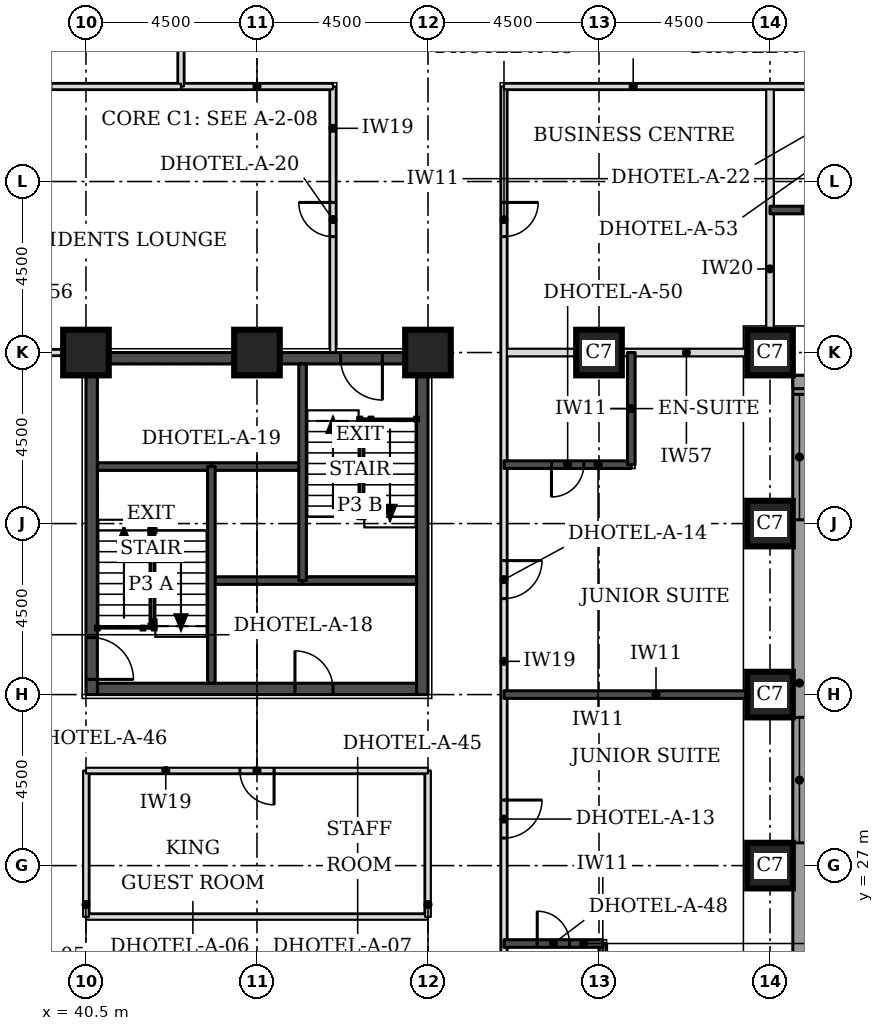
"""IFC4 building model, lengths in metres.
Left out: names, types, materials, properties, quantities, classifications, styles, units other than length and angle.
Written with IfcOpenShell. Run it as: python <this file> out.ifc"""

import sys

from ifc_helpers import new_model, si_unit, direction, frame, frame_2d, origin, origin_2d, place, context, subcontext, project, spatial, rectangle, extrude, element, fill, save


model = new_model("IFC4")
c1 = context("Model", 3, precision=1e-05, world=origin(), true_north=direction((0.0, 1.0)))
c2 = subcontext(c1, "Body", "Model", "MODEL_VIEW")
j1 = project(units=[si_unit("LENGTHUNIT", "METRE"), si_unit("PLANEANGLEUNIT", "RADIAN")], contexts=[c1])
p1 = place(None, origin())
s1 = spatial("IfcSite", under=j1, at=p1, CompositionType="ELEMENT")
p2 = place(p1, origin())
s2 = spatial("IfcBuilding", under=s1, at=p2, CompositionType="ELEMENT")
p3 = place(p2, frame((0.0, 0.0, 26.4)))
s3 = spatial("IfcBuildingStorey", under=s2, at=p3, CompositionType="ELEMENT", Elevation=26.4)
for number, where, z_axis, x_axis in (
    (1, (58.5, 27.0, 0.0), (0.0, 0.0, 1.0), (1.0, 0.0, 0.0)),
    (2, (58.5, 31.5, 0.0), (0.0, 0.0, 1.0), (1.0, 0.0, 0.0)),
    (3, (58.5, 36.0, 0.0), (0.0, 0.0, 1.0), (1.0, 0.0, 0.0)),
    (4, (40.5, 40.5, 0.0), (0.0, 0.0, 1.0), (1.0, 0.0, 0.0)),
    (5, (45.0, 40.5, 0.0), (0.0, 0.0, 1.0), (1.0, 0.0, 0.0)),
    (6, (49.5, 40.5, 0.0), (0.0, 0.0, 1.0), (1.0, 0.0, 0.0)),
    (7, (54.0, 40.5, 0.0), (0.0, 0.0, 1.0), (1.0, 0.0, 0.0)),
    (8, (58.5, 40.5, 0.0), (0.0, 0.0, 1.0), (1.0, 0.0, 0.0)),
):
    element("IfcColumn", number, at=place(p3, frame(where, z_axis=z_axis, x_axis=x_axis)), inside=s3, PredefinedType="COLUMN", context=c2, shape_type="SweptSolid", body=[
        extrude(rectangle(XDim=1.2, YDim=1.2, at=origin_2d()), origin(), (0.0, 0.0, 1.0), 3.3),
    ])
p4 = place(p3, frame((40.8, 31.65, 0.0), z_axis=(0.0, 0.0, 1.0), x_axis=(1.0, 0.0, 0.0)))
e9 = element("IfcWall", 9, at=p4, inside=s3, PredefinedType="SHEAR", context=c2, shape_type="SweptSolid", body=[
    extrude(rectangle(XDim=8.4, YDim=0.3, at=frame_2d((4.2, 0.0))), origin(), (0.0, 0.0, 1.0), 3.3),
])
p5 = place(p4, frame((5.2, 0.0, 0.0)))
e10 = element("IfcOpeningElement", 10, at=p5, cuts=e9, PredefinedType="OPENING", context=c2, shape_type="SweptSolid", body=[
    extrude(rectangle(XDim=1.0, YDim=2.1, at=frame_2d((0.5, 1.05))), frame((0.0, 0.16, 0.0), z_axis=(0.0, -1.0, 0.0), x_axis=(1.0, 0.0, 0.0)), (0.0, 0.0, 1.0), 0.32),
])
p6 = place(p3, frame((40.8, 40.35, 0.0), z_axis=(0.0, 0.0, 1.0), x_axis=(1.0, 0.0, 0.0)))
e11 = element("IfcWall", 11, at=p6, inside=s3, PredefinedType="SHEAR", context=c2, shape_type="SweptSolid", body=[
    extrude(rectangle(XDim=8.4, YDim=0.3, at=frame_2d((4.2, 0.0))), origin(), (0.0, 0.0, 1.0), 3.3),
])
p7 = place(p6, frame((6.4, 0.0, 0.0)))
e12 = element("IfcOpeningElement", 12, at=p7, cuts=e11, PredefinedType="OPENING", context=c2, shape_type="SweptSolid", body=[
    extrude(rectangle(XDim=1.1, YDim=2.1, at=frame_2d((0.55, 1.05))), frame((0.0, 0.16, 0.0), z_axis=(0.0, -1.0, 0.0), x_axis=(1.0, 0.0, 0.0)), (0.0, 0.0, 1.0), 0.32),
])
p8 = place(p3, frame((40.65, 31.5, 0.0), z_axis=(0.0, 0.0, 1.0), x_axis=(0.0, 1.0, 0.0)))
e13 = element("IfcWall", 13, at=p8, inside=s3, PredefinedType="SHEAR", context=c2, shape_type="SweptSolid", body=[
    extrude(rectangle(XDim=9.0, YDim=0.3, at=frame_2d((4.5, 0.0))), origin(), (0.0, 0.0, 1.0), 3.3),
])
p9 = place(p8, frame((0.4, 0.0, 0.0)))
e14 = element("IfcOpeningElement", 14, at=p9, cuts=e13, PredefinedType="OPENING", context=c2, shape_type="SweptSolid", body=[
    extrude(rectangle(XDim=1.1, YDim=2.1, at=frame_2d((0.55, 1.05))), frame((0.0, 0.16, 0.0), z_axis=(0.0, -1.0, 0.0), x_axis=(1.0, 0.0, 0.0)), (0.0, 0.0, 1.0), 0.32),
])
p10 = place(p3, frame((49.35, 31.5, 0.0), z_axis=(0.0, 0.0, 1.0), x_axis=(0.0, 1.0, 0.0)))
e15 = element("IfcWall", 15, at=p10, inside=s3, PredefinedType="SHEAR", context=c2, shape_type="SweptSolid", body=[
    extrude(rectangle(XDim=9.0, YDim=0.3, at=frame_2d((4.5, 0.0))), origin(), (0.0, 0.0, 1.0), 3.3),
])
p11 = place(p3, frame((59.275, 22.106, 0.0), z_axis=(0.0, 0.0, 1.0), x_axis=(0.0, 1.0, 0.0)))
e16 = element("IfcWall", 16, at=p11, inside=s3, PredefinedType="STANDARD", context=c2, shape_type="SweptSolid", body=[
    extrude(rectangle(XDim=17.793, YDim=0.35, at=frame_2d((8.897, 0.0))), origin(), (0.0, 0.0, 1.0), 3.055),
])
p12 = place(p11, frame((5.493, 0.0, 0.8)))
e17 = element("IfcOpeningElement", 17, at=p12, cuts=e16, PredefinedType="OPENING", context=c2, shape_type="SweptSolid", body=[
    extrude(rectangle(XDim=3.3, YDim=1.5, at=frame_2d((1.65, 0.75))), frame((0.0, 0.185, 0.0), z_axis=(0.0, -1.0, 0.0), x_axis=(1.0, 0.0, 0.0)), (0.0, 0.0, 1.0), 0.37),
])
p13 = place(p11, frame((13.993, 0.0, 0.8)))
e18 = element("IfcOpeningElement", 18, at=p13, cuts=e16, PredefinedType="OPENING", context=c2, shape_type="SweptSolid", body=[
    extrude(rectangle(XDim=3.3, YDim=1.5, at=frame_2d((1.65, 0.75))), frame((0.0, 0.185, 0.0), z_axis=(0.0, -1.0, 0.0), x_axis=(1.0, 0.0, 0.0)), (0.0, 0.0, 1.0), 0.37),
])
p14 = place(p3, frame((59.1, 39.725, 0.0), z_axis=(0.0, 0.0, 1.0), x_axis=(1.0, 0.0, 0.0)))
e19 = element("IfcWall", 19, at=p14, inside=s3, PredefinedType="STANDARD", context=c2, shape_type="SweptSolid", body=[
    extrude(rectangle(XDim=13.293, YDim=0.35, at=frame_2d((6.647, 0.0))), origin(), (0.0, 0.0, 1.0), 3.055),
])
p15 = place(p14, frame((0.5, 0.0, 0.8)))
e20 = element("IfcOpeningElement", 20, at=p15, cuts=e19, PredefinedType="OPENING", context=c2, shape_type="SweptSolid", body=[
    extrude(rectangle(XDim=3.3, YDim=1.5, at=frame_2d((1.65, 0.75))), frame((0.0, 0.185, 0.0), z_axis=(0.0, -1.0, 0.0), x_axis=(1.0, 0.0, 0.0)), (0.0, 0.0, 1.0), 0.37),
])
p16 = place(p3, frame((51.5, 40.5, 0.0), z_axis=(0.0, 0.0, 1.0), x_axis=(1.0, 0.0, 0.0)))
e21 = element("IfcWall", 21, at=p16, inside=s3, PredefinedType="PARTITIONING", context=c2, shape_type="SweptSolid", body=[
    extrude(rectangle(XDim=6.4, YDim=0.2, at=frame_2d((3.2, 0.0))), origin(), (0.0, 0.0, 1.0), 2.33),
])
p17 = place(p3, frame((58.5, 41.1, 0.0), z_axis=(0.0, 0.0, 1.0), x_axis=(0.0, 1.0, 0.0)))
e22 = element("IfcWall", 22, at=p17, inside=s3, PredefinedType="PARTITIONING", context=c2, shape_type="SweptSolid", body=[
    extrude(rectangle(XDim=6.4, YDim=0.2, at=frame_2d((3.2, 0.0))), origin(), (0.0, 0.0, 1.0), 3.08),
])
p18 = place(p3, frame((51.5, 23.65, 0.0), z_axis=(0.0, 0.0, 1.0), x_axis=(0.0, 1.0, 0.0)))
e23 = element("IfcWall", 23, at=p18, inside=s3, PredefinedType="PARTITIONING", context=c2, shape_type="SweptSolid", body=[
    extrude(rectangle(XDim=23.85, YDim=0.15, at=frame_2d((11.925, 0.0))), origin(), (0.0, 0.0, 1.0), 3.08),
])
p19 = place(p18, frame((4.075, 0.0, 0.0)))
e24 = element("IfcOpeningElement", 24, at=p19, cuts=e23, PredefinedType="OPENING", context=c2, shape_type="SweptSolid", body=[
    extrude(rectangle(XDim=1.0, YDim=2.1, at=frame_2d((0.5, 1.05))), frame((0.0, 0.085, 0.0), z_axis=(0.0, -1.0, 0.0), x_axis=(1.0, 0.0, 0.0)), (0.0, 0.0, 1.0), 0.17),
])
p20 = place(p18, frame((10.375, 0.0, 0.0)))
e25 = element("IfcOpeningElement", 25, at=p20, cuts=e23, PredefinedType="OPENING", context=c2, shape_type="SweptSolid", body=[
    extrude(rectangle(XDim=1.0, YDim=2.1, at=frame_2d((0.5, 1.05))), frame((0.0, 0.085, 0.0), z_axis=(0.0, -1.0, 0.0), x_axis=(1.0, 0.0, 0.0)), (0.0, 0.0, 1.0), 0.17),
])
p21 = place(p18, frame((19.9, 0.0, 0.0)))
e26 = element("IfcOpeningElement", 26, at=p21, cuts=e23, PredefinedType="OPENING", context=c2, shape_type="SweptSolid", body=[
    extrude(rectangle(XDim=0.9, YDim=2.1, at=frame_2d((0.45, 1.05))), frame((0.0, 0.085, 0.0), z_axis=(0.0, -1.0, 0.0), x_axis=(1.0, 0.0, 0.0)), (0.0, 0.0, 1.0), 0.17),
])
p22 = place(p3, frame((40.5, 25.65, 0.0), z_axis=(0.0, 0.0, 1.0), x_axis=(1.0, 0.0, 0.0)))
e27 = element("IfcWall", 27, at=p22, inside=s3, PredefinedType="PARTITIONING", context=c2, shape_type="SweptSolid", body=[
    extrude(rectangle(XDim=9.0, YDim=0.15, at=frame_2d((4.5, 0.0))), origin(), (0.0, 0.0, 1.0), 3.08),
])
for number, where, z_axis, x_axis in (
    (28, (40.5, 25.65, 0.0), (0.0, 0.0, 1.0), (0.0, 1.0, 0.0)),
    (29, (49.5, 25.65, 0.0), (0.0, 0.0, 1.0), (0.0, 1.0, 0.0)),
):
    element("IfcWall", number, at=place(p3, frame(where, z_axis=z_axis, x_axis=x_axis)), inside=s3, PredefinedType="PARTITIONING", context=c2, shape_type="SweptSolid", body=[
        extrude(rectangle(XDim=3.85, YDim=0.15, at=frame_2d((1.925, 0.0))), origin(), (0.0, 0.0, 1.0), 3.08),
    ])
p23 = place(p3, frame((40.5, 29.5, 0.0), z_axis=(0.0, 0.0, 1.0), x_axis=(1.0, 0.0, 0.0)))
e30 = element("IfcWall", 30, at=p23, inside=s3, PredefinedType="PARTITIONING", context=c2, shape_type="SweptSolid", body=[
    extrude(rectangle(XDim=9.0, YDim=0.15, at=frame_2d((4.5, 0.0))), origin(), (0.0, 0.0, 1.0), 3.08),
])
p24 = place(p23, frame((4.05, 0.0, 0.0)))
e31 = element("IfcOpeningElement", 31, at=p24, cuts=e30, PredefinedType="OPENING", context=c2, shape_type="SweptSolid", body=[
    extrude(rectangle(XDim=0.9, YDim=2.1, at=frame_2d((0.45, 1.05))), frame((0.0, 0.085, 0.0), z_axis=(0.0, -1.0, 0.0), x_axis=(1.0, 0.0, 0.0)), (0.0, 0.0, 1.0), 0.17),
])
p25 = place(p3, frame((38.5, 40.5, 0.0), z_axis=(0.0, 0.0, 1.0), x_axis=(1.0, 0.0, 0.0)))
e32 = element("IfcWall", 32, at=p25, inside=s3, PredefinedType="PARTITIONING", context=c2, shape_type="SweptSolid", body=[
    extrude(rectangle(XDim=1.95, YDim=0.15, at=frame_2d((0.975, 0.0))), origin(), (0.0, 0.0, 1.0), 2.33),
])
p26 = place(p3, frame((47.0, 40.5, 0.0), z_axis=(0.0, 0.0, 1.0), x_axis=(0.0, 1.0, 0.0)))
e33 = element("IfcWall", 33, at=p26, inside=s3, PredefinedType="PARTITIONING", context=c2, shape_type="SweptSolid", body=[
    extrude(rectangle(XDim=7.0, YDim=0.15, at=frame_2d((3.5, 0.0))), origin(), (0.0, 0.0, 1.0), 3.08),
])
p27 = place(p26, frame((3.05, 0.0, 0.0)))
e34 = element("IfcOpeningElement", 34, at=p27, cuts=e33, PredefinedType="OPENING", context=c2, shape_type="SweptSolid", body=[
    extrude(rectangle(XDim=0.9, YDim=2.1, at=frame_2d((0.45, 1.05))), frame((0.0, 0.085, 0.0), z_axis=(0.0, -1.0, 0.0), x_axis=(1.0, 0.0, 0.0)), (0.0, 0.0, 1.0), 0.17),
])
p28 = place(p3, frame((43.0, 47.5, 0.0), z_axis=(0.0, 0.0, 1.0), x_axis=(1.0, 0.0, 0.0)))
e35 = element("IfcWall", 35, at=p28, inside=s3, PredefinedType="PARTITIONING", context=c2, shape_type="SweptSolid", body=[
    extrude(rectangle(XDim=4.0, YDim=0.15, at=frame_2d((2.0, 0.0))), origin(), (0.0, 0.0, 1.0), 3.08),
])
p29 = place(p3, frame((43.0, 47.5, 0.0), z_axis=(0.0, 0.0, 1.0), x_axis=(0.0, 1.0, 0.0)))
e36 = element("IfcWall", 36, at=p29, inside=s3, PredefinedType="PARTITIONING", context=c2, shape_type="SweptSolid", body=[
    extrude(rectangle(XDim=6.5, YDim=0.15, at=frame_2d((3.25, 0.0))), origin(), (0.0, 0.0, 1.0), 3.08),
])
p30 = place(p3, frame((51.5, 47.5, 0.0), z_axis=(0.0, 0.0, 1.0), x_axis=(1.0, 0.0, 0.0)))
e37 = element("IfcWall", 37, at=p30, inside=s3, PredefinedType="PARTITIONING", context=c2, shape_type="SweptSolid", body=[
    extrude(rectangle(XDim=18.0, YDim=0.15, at=frame_2d((9.0, 0.0))), origin(), (0.0, 0.0, 1.0), 3.08),
])
p31 = place(p30, frame((12.075, 0.0, 0.0)))
e38 = element("IfcOpeningElement", 38, at=p31, cuts=e37, PredefinedType="OPENING", context=c2, shape_type="SweptSolid", body=[
    extrude(rectangle(XDim=1.0, YDim=2.1, at=frame_2d((0.5, 1.05))), frame((0.0, 0.085, 0.0), z_axis=(0.0, -1.0, 0.0), x_axis=(1.0, 0.0, 0.0)), (0.0, 0.0, 1.0), 0.17),
])
p32 = place(p30, frame((9.675, 0.0, 0.0)))
e39 = element("IfcOpeningElement", 39, at=p32, cuts=e37, PredefinedType="OPENING", context=c2, shape_type="SweptSolid", body=[
    extrude(rectangle(XDim=1.0, YDim=2.1, at=frame_2d((0.5, 1.05))), frame((0.0, 0.085, 0.0), z_axis=(0.0, -1.0, 0.0), x_axis=(1.0, 0.0, 0.0)), (0.0, 0.0, 1.0), 0.17),
])
p33 = place(p30, frame((16.5, 0.0, 0.0)))
e40 = element("IfcOpeningElement", 40, at=p33, cuts=e37, PredefinedType="OPENING", context=c2, shape_type="SweptSolid", body=[
    extrude(rectangle(XDim=1.0, YDim=2.1, at=frame_2d((0.5, 1.05))), frame((0.0, 0.085, 0.0), z_axis=(0.0, -1.0, 0.0), x_axis=(1.0, 0.0, 0.0)), (0.0, 0.0, 1.0), 0.17),
])
p34 = place(p3, frame((54.1, 22.5, 0.0), z_axis=(0.0, 0.0, 1.0), x_axis=(0.0, 1.0, 0.0)))
e41 = element("IfcWall", 41, at=p34, inside=s3, PredefinedType="SOLIDWALL", context=c2, shape_type="SweptSolid", body=[
    extrude(rectangle(XDim=2.45, YDim=0.2, at=frame_2d((1.225, 0.0))), origin(), (0.0, 0.0, 1.0), 3.08),
])
p35 = place(p3, frame((51.5, 24.95, 0.0), z_axis=(0.0, 0.0, 1.0), x_axis=(1.0, 0.0, 0.0)))
e42 = element("IfcWall", 42, at=p35, inside=s3, PredefinedType="SOLIDWALL", context=c2, shape_type="SweptSolid", body=[
    extrude(rectangle(XDim=2.6, YDim=0.2, at=frame_2d((1.3, 0.0))), origin(), (0.0, 0.0, 1.0), 3.08),
])
p36 = place(p35, frame((0.875, 0.0, 0.0)))
e43 = element("IfcOpeningElement", 43, at=p36, cuts=e42, PredefinedType="OPENING", context=c2, shape_type="SweptSolid", body=[
    extrude(rectangle(XDim=0.85, YDim=2.1, at=frame_2d((0.425, 1.05))), frame((0.0, 0.11, 0.0), z_axis=(0.0, -1.0, 0.0), x_axis=(1.0, 0.0, 0.0)), (0.0, 0.0, 1.0), 0.22),
])
p37 = place(p3, frame((51.5, 31.5, 0.0), z_axis=(0.0, 0.0, 1.0), x_axis=(1.0, 0.0, 0.0)))
e44 = element("IfcWall", 44, at=p37, inside=s3, PredefinedType="SOLIDWALL", context=c2, shape_type="SweptSolid", body=[
    extrude(rectangle(XDim=6.4, YDim=0.2, at=frame_2d((3.2, 0.0))), origin(), (0.0, 0.0, 1.0), 3.08),
])
p38 = place(p3, frame((51.5, 37.55, 0.0), z_axis=(0.0, 0.0, 1.0), x_axis=(1.0, 0.0, 0.0)))
e45 = element("IfcWall", 45, at=p38, inside=s3, PredefinedType="SOLIDWALL", context=c2, shape_type="SweptSolid", body=[
    extrude(rectangle(XDim=3.35, YDim=0.2, at=frame_2d((1.675, 0.0))), origin(), (0.0, 0.0, 1.0), 3.08),
])
p39 = place(p38, frame((1.25, 0.0, 0.0)))
e46 = element("IfcOpeningElement", 46, at=p39, cuts=e45, PredefinedType="OPENING", context=c2, shape_type="SweptSolid", body=[
    extrude(rectangle(XDim=0.85, YDim=2.1, at=frame_2d((0.425, 1.05))), frame((0.0, 0.11, 0.0), z_axis=(0.0, -1.0, 0.0), x_axis=(1.0, 0.0, 0.0)), (0.0, 0.0, 1.0), 0.22),
])
p40 = place(p3, frame((54.85, 37.55, 0.0), z_axis=(0.0, 0.0, 1.0), x_axis=(0.0, 1.0, 0.0)))
e47 = element("IfcWall", 47, at=p40, inside=s3, PredefinedType="SOLIDWALL", context=c2, shape_type="SweptSolid", body=[
    extrude(rectangle(XDim=2.95, YDim=0.2, at=frame_2d((1.475, 0.0))), origin(), (0.0, 0.0, 1.0), 3.08),
])
p41 = place(p3, frame((58.5, 44.25, 0.0), z_axis=(0.0, 0.0, 1.0), x_axis=(1.0, 0.0, 0.0)))
e48 = element("IfcWall", 48, at=p41, inside=s3, PredefinedType="SOLIDWALL", context=c2, shape_type="SweptSolid", body=[
    extrude(rectangle(XDim=1.85, YDim=0.2, at=frame_2d((0.925, 0.0))), origin(), (0.0, 0.0, 1.0), 3.08),
])
p42 = place(p3, frame((36.0, 47.5, 0.0), z_axis=(0.0, 0.0, 1.0), x_axis=(1.0, 0.0, 0.0)))
e49 = element("IfcWall", 49, at=p42, inside=s3, PredefinedType="PARTITIONING", context=c2, shape_type="SweptSolid", body=[
    extrude(rectangle(XDim=7.0, YDim=0.15, at=frame_2d((3.5, 0.0))), origin(), (0.0, 0.0, 1.0), 3.08),
])
p43 = place(p3, frame((43.8, 34.5, 0.0), z_axis=(0.0, 0.0, 1.0), x_axis=(1.0, 0.0, 0.0)))
e50 = element("IfcWall", 50, at=p43, inside=s3, PredefinedType="SOLIDWALL", context=c2, shape_type="SweptSolid", body=[
    extrude(rectangle(XDim=2.4, YDim=0.2, at=frame_2d((1.2, 0.0))), origin(), (0.0, 0.0, 1.0), 3.08),
])
p44 = place(p3, frame((46.2, 34.5, 0.0), z_axis=(0.0, 0.0, 1.0), x_axis=(1.0, 0.0, 0.0)))
e51 = element("IfcWall", 51, at=p44, inside=s3, PredefinedType="SOLIDWALL", context=c2, shape_type="SweptSolid", body=[
    extrude(rectangle(XDim=3.0, YDim=0.2, at=frame_2d((1.5, 0.0))), origin(), (0.0, 0.0, 1.0), 3.08),
])
p45 = place(p3, frame((43.8, 37.5, 0.0), z_axis=(0.0, 0.0, 1.0), x_axis=(1.0, 0.0, 0.0)))
e52 = element("IfcWall", 52, at=p45, inside=s3, PredefinedType="SOLIDWALL", context=c2, shape_type="SweptSolid", body=[
    extrude(rectangle(XDim=2.4, YDim=0.2, at=frame_2d((1.2, 0.0))), origin(), (0.0, 0.0, 1.0), 3.3),
])
p46 = place(p3, frame((40.8, 37.5, 0.0), z_axis=(0.0, 0.0, 1.0), x_axis=(1.0, 0.0, 0.0)))
e53 = element("IfcWall", 53, at=p46, inside=s3, PredefinedType="SOLIDWALL", context=c2, shape_type="SweptSolid", body=[
    extrude(rectangle(XDim=3.0, YDim=0.2, at=frame_2d((1.5, 0.0))), origin(), (0.0, 0.0, 1.0), 3.08),
])
for number, where, z_axis, x_axis in (
    (54, (43.8, 31.8, 0.0), (0.0, 0.0, 1.0), (0.0, 1.0, 0.0)),
    (55, (46.2, 34.5, 0.0), (0.0, 0.0, 1.0), (0.0, 1.0, 0.0)),
):
    element("IfcWall", number, at=place(p3, frame(where, z_axis=z_axis, x_axis=x_axis)), inside=s3, PredefinedType="SOLIDWALL", context=c2, shape_type="SweptSolid", body=[
        extrude(rectangle(XDim=5.7, YDim=0.2, at=frame_2d((2.85, 0.0))), origin(), (0.0, 0.0, 1.0), 3.08),
    ])
p47 = place(p12, origin())
e56 = element("IfcWindow", 56, at=p47, inside=s3, PartitioningType="SINGLE_PANEL", PredefinedType="WINDOW", context=c2, shape_type="SweptSolid", body=[
    extrude(rectangle(XDim=3.3, YDim=1.5, at=frame_2d((1.65, 0.75))), frame((0.0, 0.085, 0.0), z_axis=(0.0, -1.0, 0.0), x_axis=(1.0, 0.0, 0.0)), (0.0, 0.0, 1.0), 0.06),
])
fill(e17, e56)
p48 = place(p13, origin())
e57 = element("IfcWindow", 57, at=p48, inside=s3, PartitioningType="SINGLE_PANEL", PredefinedType="WINDOW", context=c2, shape_type="SweptSolid", body=[
    extrude(rectangle(XDim=3.3, YDim=1.5, at=frame_2d((1.65, 0.75))), frame((0.0, 0.085, 0.0), z_axis=(0.0, -1.0, 0.0), x_axis=(1.0, 0.0, 0.0)), (0.0, 0.0, 1.0), 0.06),
])
fill(e18, e57)
p49 = place(p19, frame((1.0, 0.0, 0.0), z_axis=(0.0, 0.0, 1.0), x_axis=(-1.0, 0.0, 0.0)))
e58 = element("IfcDoor", 58, at=p49, inside=s3, OperationType="SINGLE_SWING_LEFT", PredefinedType="DOOR", context=c2, shape_type="SweptSolid", body=[
    extrude(rectangle(XDim=1.0, YDim=2.1, at=frame_2d((0.5, 1.05))), frame((0.0, 0.025, 0.0), z_axis=(0.0, -1.0, 0.0), x_axis=(1.0, 0.0, 0.0)), (0.0, 0.0, 1.0), 0.05),
])
fill(e24, e58)
p50 = place(p36, origin())
e59 = element("IfcDoor", 59, at=p50, inside=s3, OperationType="SINGLE_SWING_LEFT", PredefinedType="DOOR", context=c2, shape_type="SweptSolid", body=[
    extrude(rectangle(XDim=0.85, YDim=2.1, at=frame_2d((0.425, 1.05))), frame((0.0, 0.025, 0.0), z_axis=(0.0, -1.0, 0.0), x_axis=(1.0, 0.0, 0.0)), (0.0, 0.0, 1.0), 0.05),
])
fill(e43, e59)
p51 = place(p20, frame((1.0, 0.0, 0.0), z_axis=(0.0, 0.0, 1.0), x_axis=(-1.0, 0.0, 0.0)))
e60 = element("IfcDoor", 60, at=p51, inside=s3, OperationType="SINGLE_SWING_LEFT", PredefinedType="DOOR", context=c2, shape_type="SweptSolid", body=[
    extrude(rectangle(XDim=1.0, YDim=2.1, at=frame_2d((0.5, 1.05))), frame((0.0, 0.025, 0.0), z_axis=(0.0, -1.0, 0.0), x_axis=(1.0, 0.0, 0.0)), (0.0, 0.0, 1.0), 0.05),
])
fill(e25, e60)
p52 = place(p39, frame((0.85, 0.0, 0.0), z_axis=(0.0, 0.0, 1.0), x_axis=(-1.0, 0.0, 0.0)))
e61 = element("IfcDoor", 61, at=p52, inside=s3, OperationType="SINGLE_SWING_RIGHT", PredefinedType="DOOR", context=c2, shape_type="SweptSolid", body=[
    extrude(rectangle(XDim=0.85, YDim=2.1, at=frame_2d((0.425, 1.05))), frame((0.0, 0.025, 0.0), z_axis=(0.0, -1.0, 0.0), x_axis=(1.0, 0.0, 0.0)), (0.0, 0.0, 1.0), 0.05),
])
fill(e46, e61)
p53 = place(p24, frame((0.9, 0.0, 0.0), z_axis=(0.0, 0.0, 1.0), x_axis=(-1.0, 0.0, 0.0)))
e62 = element("IfcDoor", 62, at=p53, inside=s3, OperationType="SINGLE_SWING_LEFT", PredefinedType="DOOR", context=c2, shape_type="SweptSolid", body=[
    extrude(rectangle(XDim=0.9, YDim=2.1, at=frame_2d((0.45, 1.05))), frame((0.0, 0.025, 0.0), z_axis=(0.0, -1.0, 0.0), x_axis=(1.0, 0.0, 0.0)), (0.0, 0.0, 1.0), 0.05),
])
fill(e31, e62)
p54 = place(p27, origin())
e63 = element("IfcDoor", 63, at=p54, inside=s3, OperationType="SINGLE_SWING_RIGHT", PredefinedType="DOOR", context=c2, shape_type="SweptSolid", body=[
    extrude(rectangle(XDim=0.9, YDim=2.1, at=frame_2d((0.45, 1.05))), frame((0.0, 0.025, 0.0), z_axis=(0.0, -1.0, 0.0), x_axis=(1.0, 0.0, 0.0)), (0.0, 0.0, 1.0), 0.05),
])
fill(e34, e63)
p55 = place(p21, frame((0.9, 0.0, 0.0), z_axis=(0.0, 0.0, 1.0), x_axis=(-1.0, 0.0, 0.0)))
e64 = element("IfcDoor", 64, at=p55, inside=s3, OperationType="SINGLE_SWING_LEFT", PredefinedType="DOOR", context=c2, shape_type="SweptSolid", body=[
    extrude(rectangle(XDim=0.9, YDim=2.1, at=frame_2d((0.45, 1.05))), frame((0.0, 0.025, 0.0), z_axis=(0.0, -1.0, 0.0), x_axis=(1.0, 0.0, 0.0)), (0.0, 0.0, 1.0), 0.05),
])
fill(e26, e64)
p56 = place(p9, frame((1.1, 0.0, 0.0), z_axis=(0.0, 0.0, 1.0), x_axis=(-1.0, 0.0, 0.0)))
e65 = element("IfcDoor", 65, at=p56, inside=s3, OperationType="SINGLE_SWING_RIGHT", PredefinedType="DOOR", context=c2, shape_type="SweptSolid", body=[
    extrude(rectangle(XDim=1.1, YDim=2.1, at=frame_2d((0.55, 1.05))), frame((0.0, 0.025, 0.0), z_axis=(0.0, -1.0, 0.0), x_axis=(1.0, 0.0, 0.0)), (0.0, 0.0, 1.0), 0.05),
])
fill(e14, e65)
p57 = place(p7, frame((1.1, 0.0, 0.0), z_axis=(0.0, 0.0, 1.0), x_axis=(-1.0, 0.0, 0.0)))
e66 = element("IfcDoor", 66, at=p57, inside=s3, OperationType="SINGLE_SWING_LEFT", PredefinedType="DOOR", context=c2, shape_type="SweptSolid", body=[
    extrude(rectangle(XDim=1.1, YDim=2.1, at=frame_2d((0.55, 1.05))), frame((0.0, 0.025, 0.0), z_axis=(0.0, -1.0, 0.0), x_axis=(1.0, 0.0, 0.0)), (0.0, 0.0, 1.0), 0.05),
])
fill(e12, e66)
p58 = place(p5, origin())
e67 = element("IfcDoor", 67, at=p58, inside=s3, OperationType="SINGLE_SWING_LEFT", PredefinedType="DOOR", context=c2, shape_type="SweptSolid", body=[
    extrude(rectangle(XDim=1.0, YDim=2.1, at=frame_2d((0.5, 1.05))), frame((0.0, 0.025, 0.0), z_axis=(0.0, -1.0, 0.0), x_axis=(1.0, 0.0, 0.0)), (0.0, 0.0, 1.0), 0.05),
])
fill(e10, e67)
save(model, sys.argv[1])
